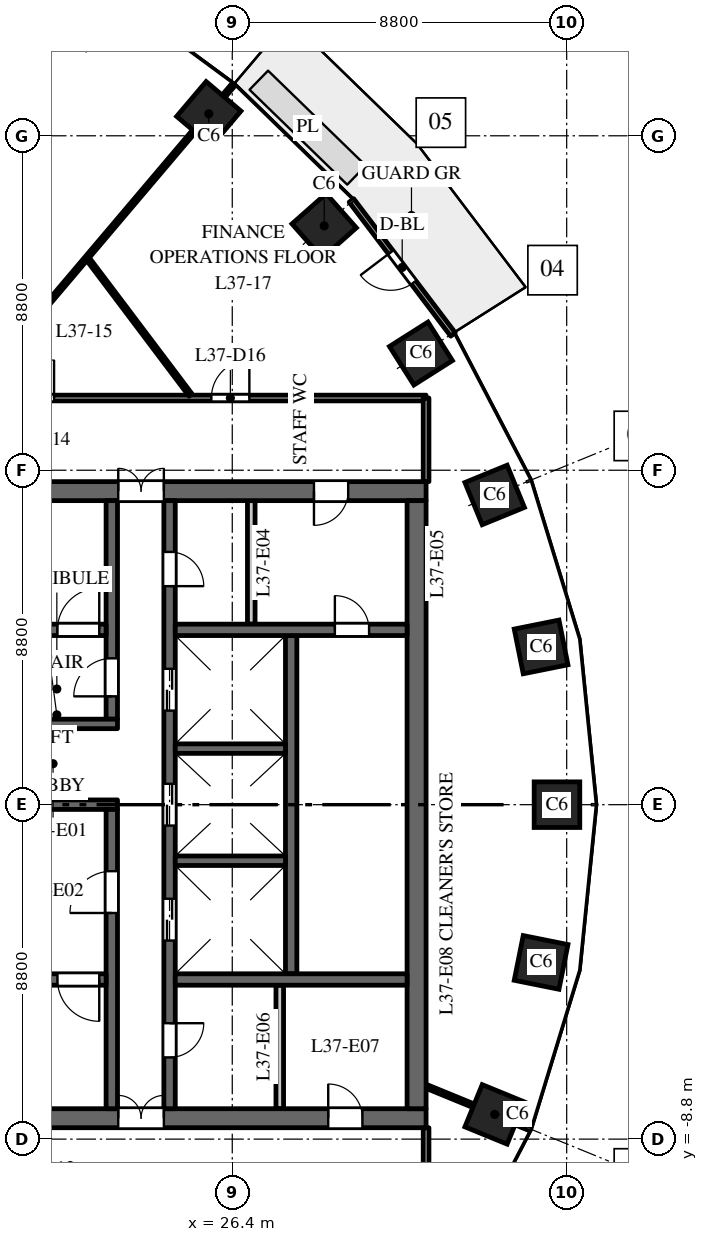
"""IFC4 building model, lengths in metres.
Left out: names, types, materials, properties, quantities, classifications, styles, units other than length and angle.
Written with IfcOpenShell. Run it as: python <this file> out.ifc"""

import sys

from ifc_helpers import new_model, si_unit, direction, frame, frame_2d, origin, origin_2d, place, context, subcontext, project, spatial, rectangle, extrude, element, fill, save


model = new_model("IFC4")
c1 = context("Model", 3, precision=1e-05, world=origin(), true_north=direction((0.0, 1.0)))
c2 = subcontext(c1, "Body", "Model", "MODEL_VIEW")
j1 = project(units=[si_unit("LENGTHUNIT", "METRE"), si_unit("PLANEANGLEUNIT", "RADIAN")], contexts=[c1])
p1 = place(None, origin())
s1 = spatial("IfcSite", under=j1, at=p1, CompositionType="ELEMENT")
p2 = place(p1, origin())
s2 = spatial("IfcBuilding", under=s1, at=p2, CompositionType="ELEMENT")
p3 = place(p2, frame((0.0, 0.0, 162.0)))
s3 = spatial("IfcBuildingStorey", under=s2, at=p3, CompositionType="ELEMENT", Elevation=162.0)
for number, where, z_axis, x_axis in (
    (1, (34.945, 0.0, 0.0), (0.0, 0.0, 1.0), (0.0, 1.0, 0.0)),
    (2, (34.527, 4.151, 0.0), (0.0, 0.0, 1.0), (-0.197, 0.98, 0.0)),
    (3, (33.305, 8.149, 0.0), (0.0, 0.0, 1.0), (-0.379, 0.925, 0.0)),
    (4, (31.365, 11.871, 0.0), (0.0, 0.0, 1.0), (-0.535, 0.845, 0.0)),
    (5, (28.819, 15.23, 0.0), (0.0, 0.0, 1.0), (-0.663, 0.749, 0.0)),
    (6, (25.783, 18.18, 0.0), (0.0, 0.0, 1.0), (-0.763, 0.646, 0.0)),
    (7, (33.305, -8.149, 0.0), (0.0, 0.0, 1.0), (0.379, 0.925, 0.0)),
    (8, (34.527, -4.151, 0.0), (0.0, 0.0, 1.0), (0.197, 0.98, 0.0)),
):
    element("IfcColumn", number, at=place(p3, frame(where, z_axis=z_axis, x_axis=x_axis)), inside=s3, PredefinedType="COLUMN", context=c2, shape_type="SweptSolid", body=[
        extrude(rectangle(XDim=1.2, YDim=1.2, at=origin_2d()), origin(), (0.0, 0.0, 1.0), 4.0),
    ])
p4 = place(p3, frame((16.5, 8.25, 0.0), z_axis=(0.0, 0.0, 1.0), x_axis=(1.0, 0.0, 0.0)))
e9 = element("IfcWall", 9, at=p4, inside=s3, PredefinedType="SHEAR", context=c2, shape_type="SweptSolid", body=[
    extrude(rectangle(XDim=15.0, YDim=0.5, at=frame_2d((7.5, 0.0))), origin(), (0.0, 0.0, 1.0), 3.7),
])
p5 = place(p4, frame((6.9, 0.0, 0.0)))
e10 = element("IfcOpeningElement", 10, at=p5, cuts=e9, PredefinedType="OPENING", context=c2, shape_type="SweptSolid", body=[
    extrude(rectangle(XDim=1.2, YDim=2.1, at=frame_2d((0.6, 1.05))), frame((0.0, 0.26, 0.0), z_axis=(0.0, -1.0, 0.0), x_axis=(1.0, 0.0, 0.0)), (0.0, 0.0, 1.0), 0.52),
])
p6 = place(p4, frame((12.05, 0.0, 0.0)))
e11 = element("IfcOpeningElement", 11, at=p6, cuts=e9, PredefinedType="OPENING", context=c2, shape_type="SweptSolid", body=[
    extrude(rectangle(XDim=0.9, YDim=2.1, at=frame_2d((0.45, 1.05))), frame((0.0, 0.26, 0.0), z_axis=(0.0, -1.0, 0.0), x_axis=(1.0, 0.0, 0.0)), (0.0, 0.0, 1.0), 0.52),
])
p7 = place(p3, frame((16.5, -8.25, 0.0), z_axis=(0.0, 0.0, 1.0), x_axis=(1.0, 0.0, 0.0)))
e12 = element("IfcWall", 12, at=p7, inside=s3, PredefinedType="SHEAR", context=c2, shape_type="SweptSolid", body=[
    extrude(rectangle(XDim=15.0, YDim=0.5, at=frame_2d((7.5, 0.0))), origin(), (0.0, 0.0, 1.0), 3.7),
])
p8 = place(p7, frame((6.9, 0.0, 0.0)))
e13 = element("IfcOpeningElement", 13, at=p8, cuts=e12, PredefinedType="OPENING", context=c2, shape_type="SweptSolid", body=[
    extrude(rectangle(XDim=1.2, YDim=2.1, at=frame_2d((0.6, 1.05))), frame((0.0, 0.26, 0.0), z_axis=(0.0, -1.0, 0.0), x_axis=(1.0, 0.0, 0.0)), (0.0, 0.0, 1.0), 0.52),
])
p9 = place(p7, frame((12.425, 0.0, 0.0)))
e14 = element("IfcOpeningElement", 14, at=p9, cuts=e12, PredefinedType="OPENING", context=c2, shape_type="SweptSolid", body=[
    extrude(rectangle(XDim=0.9, YDim=2.1, at=frame_2d((0.45, 1.05))), frame((0.0, 0.26, 0.0), z_axis=(0.0, -1.0, 0.0), x_axis=(1.0, 0.0, 0.0)), (0.0, 0.0, 1.0), 0.52),
])
p10 = place(p3, frame((27.95, -4.45, 0.0), z_axis=(0.0, 0.0, 1.0), x_axis=(0.0, 1.0, 0.0)))
e15 = element("IfcWall", 15, at=p10, inside=s3, PredefinedType="SHEAR", context=c2, shape_type="SweptSolid", body=[
    extrude(rectangle(XDim=8.9, YDim=0.3, at=frame_2d((4.45, 0.0))), origin(), (0.0, 0.0, 1.0), 3.7),
])
p11 = place(p3, frame((24.75, -8.0, 0.0), z_axis=(0.0, 0.0, 1.0), x_axis=(0.0, 1.0, 0.0)))
e16 = element("IfcWall", 16, at=p11, inside=s3, PredefinedType="SHEAR", context=c2, shape_type="SweptSolid", body=[
    extrude(rectangle(XDim=16.0, YDim=0.3, at=frame_2d((8.0, 0.0))), origin(), (0.0, 0.0, 1.0), 3.7),
])
p12 = place(p11, frame((4.425, 0.0, 0.0)))
e17 = element("IfcOpeningElement", 17, at=p12, cuts=e16, PredefinedType="OPENING", context=c2, shape_type="SweptSolid", body=[
    extrude(rectangle(XDim=1.1, YDim=2.1, at=frame_2d((0.55, 1.05))), frame((0.0, 0.16, 0.0), z_axis=(0.0, -1.0, 0.0), x_axis=(1.0, 0.0, 0.0)), (0.0, 0.0, 1.0), 0.32),
])
p13 = place(p11, frame((7.45, 0.0, 0.0)))
e18 = element("IfcOpeningElement", 18, at=p13, cuts=e16, PredefinedType="OPENING", context=c2, shape_type="SweptSolid", body=[
    extrude(rectangle(XDim=1.1, YDim=2.1, at=frame_2d((0.55, 1.05))), frame((0.0, 0.16, 0.0), z_axis=(0.0, -1.0, 0.0), x_axis=(1.0, 0.0, 0.0)), (0.0, 0.0, 1.0), 0.32),
])
p14 = place(p11, frame((10.475, 0.0, 0.0)))
e19 = element("IfcOpeningElement", 19, at=p14, cuts=e16, PredefinedType="OPENING", context=c2, shape_type="SweptSolid", body=[
    extrude(rectangle(XDim=1.1, YDim=2.1, at=frame_2d((0.55, 1.05))), frame((0.0, 0.16, 0.0), z_axis=(0.0, -1.0, 0.0), x_axis=(1.0, 0.0, 0.0)), (0.0, 0.0, 1.0), 0.32),
])
p15 = place(p11, frame((13.75, 0.0, 0.0)))
e20 = element("IfcOpeningElement", 20, at=p15, cuts=e16, PredefinedType="OPENING", context=c2, shape_type="SweptSolid", body=[
    extrude(rectangle(XDim=0.9, YDim=2.1, at=frame_2d((0.45, 1.05))), frame((0.0, 0.16, 0.0), z_axis=(0.0, -1.0, 0.0), x_axis=(1.0, 0.0, 0.0)), (0.0, 0.0, 1.0), 0.32),
])
p16 = place(p11, frame((1.35, 0.0, 0.0)))
e21 = element("IfcOpeningElement", 21, at=p16, cuts=e16, PredefinedType="OPENING", context=c2, shape_type="SweptSolid", body=[
    extrude(rectangle(XDim=0.9, YDim=2.1, at=frame_2d((0.45, 1.05))), frame((0.0, 0.16, 0.0), z_axis=(0.0, -1.0, 0.0), x_axis=(1.0, 0.0, 0.0)), (0.0, 0.0, 1.0), 0.32),
])
p17 = place(p3, frame((20.1, 0.0, 0.0), z_axis=(0.0, 0.0, 1.0), x_axis=(1.0, 0.0, 0.0)))
e22 = element("IfcWall", 22, at=p17, inside=s3, PredefinedType="SHEAR", context=c2, shape_type="SweptSolid", body=[
    extrude(rectangle(XDim=3.28, YDim=0.25, at=frame_2d((1.64, 0.0))), origin(), (0.0, 0.0, 1.0), 3.7),
])
p18 = place(p3, frame((31.25, -8.0, 0.0), z_axis=(0.0, 0.0, 1.0), x_axis=(0.0, 1.0, 0.0)))
e23 = element("IfcWall", 23, at=p18, inside=s3, PredefinedType="SHEAR", context=c2, shape_type="SweptSolid", body=[
    extrude(rectangle(XDim=16.0, YDim=0.5, at=frame_2d((8.0, 0.0))), origin(), (0.0, 0.0, 1.0), 3.7),
])
p19 = place(p3, frame((24.9, 4.6, 0.0), z_axis=(0.0, 0.0, 1.0), x_axis=(1.0, 0.0, 0.0)))
e24 = element("IfcWall", 24, at=p19, inside=s3, PredefinedType="SHEAR", context=c2, shape_type="SweptSolid", body=[
    extrude(rectangle(XDim=6.1, YDim=0.3, at=frame_2d((3.05, 0.0))), origin(), (0.0, 0.0, 1.0), 3.7),
])
p20 = place(p19, frame((4.2, 0.0, 0.0)))
e25 = element("IfcOpeningElement", 25, at=p20, cuts=e24, PredefinedType="OPENING", context=c2, shape_type="SweptSolid", body=[
    extrude(rectangle(XDim=0.9, YDim=2.1, at=frame_2d((0.45, 1.05))), frame((0.0, 0.16, 0.0), z_axis=(0.0, -1.0, 0.0), x_axis=(1.0, 0.0, 0.0)), (0.0, 0.0, 1.0), 0.32),
])
for number, where, z_axis, x_axis in (
    (26, (26.9, 4.75, 0.0), (0.0, 0.0, 1.0), (0.0, 1.0, 0.0)),
    (27, (27.65, -8.0, 0.0), (0.0, 0.0, 1.0), (0.0, 1.0, 0.0)),
):
    element("IfcWall", number, at=place(p3, frame(where, z_axis=z_axis, x_axis=x_axis)), inside=s3, PredefinedType="PARTITIONING", context=c2, shape_type="SweptSolid", body=[
        extrude(rectangle(XDim=3.25, YDim=0.2, at=frame_2d((1.625, 0.0))), origin(), (0.0, 0.0, 1.0), 3.7),
    ])
p21 = place(p3, frame((24.9, -4.6, 0.0), z_axis=(0.0, 0.0, 1.0), x_axis=(1.0, 0.0, 0.0)))
e28 = element("IfcWall", 28, at=p21, inside=s3, PredefinedType="SHEAR", context=c2, shape_type="SweptSolid", body=[
    extrude(rectangle(XDim=6.1, YDim=0.3, at=frame_2d((3.05, 0.0))), origin(), (0.0, 0.0, 1.0), 3.7),
])
for number, where, z_axis, x_axis in (
    (29, (24.9, -1.475, 0.0), (0.0, 0.0, 1.0), (1.0, 0.0, 0.0)),
    (30, (24.9, 1.475, 0.0), (0.0, 0.0, 1.0), (1.0, 0.0, 0.0)),
):
    element("IfcWall", number, at=place(p3, frame(where, z_axis=z_axis, x_axis=x_axis)), inside=s3, PredefinedType="SHEAR", context=c2, shape_type="SweptSolid", body=[
        extrude(rectangle(XDim=2.9, YDim=0.25, at=frame_2d((1.45, 0.0))), origin(), (0.0, 0.0, 1.0), 3.7),
    ])
p22 = place(p3, frame((23.23, 2.25, 0.0), z_axis=(0.0, 0.0, 1.0), x_axis=(0.0, 1.0, 0.0)))
e31 = element("IfcWall", 31, at=p22, inside=s3, PredefinedType="SHEAR", context=c2, shape_type="SweptSolid", body=[
    extrude(rectangle(XDim=5.75, YDim=0.3, at=frame_2d((2.875, 0.0))), origin(), (0.0, 0.0, 1.0), 3.7),
])
p23 = place(p22, frame((0.6, 0.0, 0.0)))
e32 = element("IfcOpeningElement", 32, at=p23, cuts=e31, PredefinedType="OPENING", context=c2, shape_type="SweptSolid", body=[
    extrude(rectangle(XDim=1.0, YDim=2.1, at=frame_2d((0.5, 1.05))), frame((0.0, 0.16, 0.0), z_axis=(0.0, -1.0, 0.0), x_axis=(1.0, 0.0, 0.0)), (0.0, 0.0, 1.0), 0.32),
])
p24 = place(p3, frame((23.23, -8.0, 0.0), z_axis=(0.0, 0.0, 1.0), x_axis=(0.0, 1.0, 0.0)))
e33 = element("IfcWall", 33, at=p24, inside=s3, PredefinedType="SHEAR", context=c2, shape_type="SweptSolid", body=[
    extrude(rectangle(XDim=7.875, YDim=0.3, at=frame_2d((3.938, 0.0))), origin(), (0.0, 0.0, 1.0), 3.7),
])
p25 = place(p24, frame((5.15, 0.0, 0.0)))
e34 = element("IfcOpeningElement", 34, at=p25, cuts=e33, PredefinedType="OPENING", context=c2, shape_type="SweptSolid", body=[
    extrude(rectangle(XDim=1.1, YDim=2.1, at=frame_2d((0.55, 1.05))), frame((0.0, 0.16, 0.0), z_axis=(0.0, -1.0, 0.0), x_axis=(1.0, 0.0, 0.0)), (0.0, 0.0, 1.0), 0.32),
])
p26 = place(p3, frame((16.9, 4.6, 0.0), z_axis=(0.0, 0.0, 1.0), x_axis=(1.0, 0.0, 0.0)))
e35 = element("IfcWall", 35, at=p26, inside=s3, PredefinedType="SHEAR", context=c2, shape_type="SweptSolid", body=[
    extrude(rectangle(XDim=6.18, YDim=0.3, at=frame_2d((3.09, 0.0))), origin(), (0.0, 0.0, 1.0), 3.7),
])
p27 = place(p26, frame((4.9, 0.0, 0.0)))
e36 = element("IfcOpeningElement", 36, at=p27, cuts=e35, PredefinedType="OPENING", context=c2, shape_type="SweptSolid", body=[
    extrude(rectangle(XDim=1.1, YDim=2.1, at=frame_2d((0.55, 1.05))), frame((0.0, 0.16, 0.0), z_axis=(0.0, -1.0, 0.0), x_axis=(1.0, 0.0, 0.0)), (0.0, 0.0, 1.0), 0.32),
])
p28 = place(p3, frame((16.9, -4.6, 0.0), z_axis=(0.0, 0.0, 1.0), x_axis=(1.0, 0.0, 0.0)))
e37 = element("IfcWall", 37, at=p28, inside=s3, PredefinedType="SHEAR", context=c2, shape_type="SweptSolid", body=[
    extrude(rectangle(XDim=6.18, YDim=0.3, at=frame_2d((3.09, 0.0))), origin(), (0.0, 0.0, 1.0), 3.7),
])
p29 = place(p28, frame((4.9, 0.0, 0.0)))
e38 = element("IfcOpeningElement", 38, at=p29, cuts=e37, PredefinedType="OPENING", context=c2, shape_type="SweptSolid", body=[
    extrude(rectangle(XDim=1.1, YDim=2.1, at=frame_2d((0.55, 1.05))), frame((0.0, 0.16, 0.0), z_axis=(0.0, -1.0, 0.0), x_axis=(1.0, 0.0, 0.0)), (0.0, 0.0, 1.0), 0.32),
])
p30 = place(p3, frame((20.85, 2.125, 0.0), z_axis=(0.0, 0.0, 1.0), x_axis=(1.0, 0.0, 0.0)))
e39 = element("IfcWall", 39, at=p30, inside=s3, PredefinedType="SHEAR", context=c2, shape_type="SweptSolid", body=[
    extrude(rectangle(XDim=2.53, YDim=0.25, at=frame_2d((1.265, 0.0))), origin(), (0.0, 0.0, 1.0), 3.7),
])
p31 = place(p3, frame((32.208, 12.374, 0.0), z_axis=(0.0, 0.0, 1.0), x_axis=(-0.604045763106, 0.796949632081, 0.0)))
e40 = element("IfcWall", 40, at=p31, inside=s3, PredefinedType="STANDARD", context=c2, shape_type="SweptSolid", body=[
    extrude(rectangle(XDim=4.423, YDim=0.15, at=frame_2d((2.212, 0.0))), origin(), (0.0, 0.0, 1.0), 3.7),
])
p32 = place(p31, frame((1.712, 0.0, 0.0)))
e41 = element("IfcOpeningElement", 41, at=p32, cuts=e40, PredefinedType="OPENING", context=c2, shape_type="SweptSolid", body=[
    extrude(rectangle(XDim=1.0, YDim=2.4, at=frame_2d((0.5, 1.2))), frame((0.0, 0.085, 0.0), z_axis=(0.0, -1.0, 0.0), x_axis=(1.0, 0.0, 0.0)), (0.0, 0.0, 1.0), 0.17),
])
p33 = place(p3, frame((16.5, 10.7, 0.0), z_axis=(0.0, 0.0, 1.0), x_axis=(1.0, 0.0, 0.0)))
e42 = element("IfcWall", 42, at=p33, inside=s3, PredefinedType="PARTITIONING", context=c2, shape_type="SweptSolid", body=[
    extrude(rectangle(XDim=15.0, YDim=0.15, at=frame_2d((7.5, 0.0))), origin(), (0.0, 0.0, 1.0), 2.75),
])
p34 = place(p33, frame((4.211, 0.0, 0.0)))
e43 = element("IfcOpeningElement", 43, at=p34, cuts=e42, PredefinedType="OPENING", context=c2, shape_type="SweptSolid", body=[
    extrude(rectangle(XDim=1.0, YDim=2.1, at=frame_2d((0.5, 1.05))), frame((0.0, 0.085, 0.0), z_axis=(0.0, -1.0, 0.0), x_axis=(1.0, 0.0, 0.0)), (0.0, 0.0, 1.0), 0.17),
])
p35 = place(p33, frame((9.35, 0.0, 0.0)))
e44 = element("IfcOpeningElement", 44, at=p35, cuts=e42, PredefinedType="OPENING", context=c2, shape_type="SweptSolid", body=[
    extrude(rectangle(XDim=1.0, YDim=2.1, at=frame_2d((0.5, 1.05))), frame((0.0, 0.085, 0.0), z_axis=(0.0, -1.0, 0.0), x_axis=(1.0, 0.0, 0.0)), (0.0, 0.0, 1.0), 0.17),
])
p36 = place(p3, frame((19.511, 10.778, 0.0), z_axis=(0.0, 0.0, 1.0), x_axis=(0.646400187952, 0.762998556365, 0.0)))
e45 = element("IfcWall", 45, at=p36, inside=s3, PredefinedType="PARTITIONING", context=c2, shape_type="SweptSolid", body=[
    extrude(rectangle(XDim=10.704, YDim=0.1, at=frame_2d((5.352, 0.0))), origin(), (0.0, 0.0, 1.0), 2.9),
])
p37 = place(p3, frame((22.606, 14.354, 0.0), z_axis=(0.0, 0.0, 1.0), x_axis=(0.602012984229, -0.798486297202, 0.0)))
e46 = element("IfcWall", 46, at=p37, inside=s3, PredefinedType="PARTITIONING", context=c2, shape_type="SweptSolid", body=[
    extrude(rectangle(XDim=4.478, YDim=0.1, at=frame_2d((2.239, 0.0))), origin(), (0.0, 0.0, 1.0), 2.75),
])
p38 = place(p3, frame((31.5, -10.7, 0.0), z_axis=(0.0, 0.0, 1.0), x_axis=(0.0, 1.0, 0.0)))
e47 = element("IfcWall", 47, at=p38, inside=s3, PredefinedType="PARTITIONING", context=c2, shape_type="SweptSolid", body=[
    extrude(rectangle(XDim=2.2, YDim=0.15, at=frame_2d((1.1, 0.0))), origin(), (0.0, 0.0, 1.0), 2.9),
])
p39 = place(p3, frame((31.5, -7.41, 0.0), z_axis=(0.0, 0.0, 1.0), x_axis=(0.925344112436, -0.379128307542, 0.0)))
e48 = element("IfcWall", 48, at=p39, inside=s3, PredefinedType="PARTITIONING", context=c2, shape_type="SweptSolid", body=[
    extrude(rectangle(XDim=2.954, YDim=0.1, at=frame_2d((1.477, 0.0))), origin(), (0.0, 0.0, 1.0), 3.7),
])
p40 = place(p3, frame((31.5, 8.5, 0.0), z_axis=(0.0, 0.0, 1.0), x_axis=(0.0, 1.0, 0.0)))
e49 = element("IfcWall", 49, at=p40, inside=s3, PredefinedType="PARTITIONING", context=c2, shape_type="SweptSolid", body=[
    extrude(rectangle(XDim=2.2, YDim=0.15, at=frame_2d((1.1, 0.0))), origin(), (0.0, 0.0, 1.0), 2.9),
])
p41 = place(p12, origin())
e50 = element("IfcDoor", 50, at=p41, inside=s3, OperationType="DOUBLE_DOOR_SLIDING", PredefinedType="DOOR", context=c2, shape_type="SweptSolid", body=[
    extrude(rectangle(XDim=1.1, YDim=2.1, at=frame_2d((0.55, 1.05))), frame((0.0, 0.025, 0.0), z_axis=(0.0, -1.0, 0.0), x_axis=(1.0, 0.0, 0.0)), (0.0, 0.0, 1.0), 0.05),
])
fill(e17, e50)
p42 = place(p13, origin())
e51 = element("IfcDoor", 51, at=p42, inside=s3, OperationType="DOUBLE_DOOR_SLIDING", PredefinedType="DOOR", context=c2, shape_type="SweptSolid", body=[
    extrude(rectangle(XDim=1.1, YDim=2.1, at=frame_2d((0.55, 1.05))), frame((0.0, 0.025, 0.0), z_axis=(0.0, -1.0, 0.0), x_axis=(1.0, 0.0, 0.0)), (0.0, 0.0, 1.0), 0.05),
])
fill(e18, e51)
p43 = place(p14, origin())
e52 = element("IfcDoor", 52, at=p43, inside=s3, OperationType="DOUBLE_DOOR_SLIDING", PredefinedType="DOOR", context=c2, shape_type="SweptSolid", body=[
    extrude(rectangle(XDim=1.1, YDim=2.1, at=frame_2d((0.55, 1.05))), frame((0.0, 0.025, 0.0), z_axis=(0.0, -1.0, 0.0), x_axis=(1.0, 0.0, 0.0)), (0.0, 0.0, 1.0), 0.05),
])
fill(e19, e52)
p44 = place(p27, origin())
e53 = element("IfcDoor", 53, at=p44, inside=s3, OperationType="SINGLE_SWING_LEFT", PredefinedType="DOOR", context=c2, shape_type="SweptSolid", body=[
    extrude(rectangle(XDim=1.1, YDim=2.1, at=frame_2d((0.55, 1.05))), frame((0.0, 0.025, 0.0), z_axis=(0.0, -1.0, 0.0), x_axis=(1.0, 0.0, 0.0)), (0.0, 0.0, 1.0), 0.05),
])
fill(e36, e53)
p45 = place(p29, origin())
e54 = element("IfcDoor", 54, at=p45, inside=s3, OperationType="SINGLE_SWING_RIGHT", PredefinedType="DOOR", context=c2, shape_type="SweptSolid", body=[
    extrude(rectangle(XDim=1.1, YDim=2.1, at=frame_2d((0.55, 1.05))), frame((0.0, 0.025, 0.0), z_axis=(0.0, -1.0, 0.0), x_axis=(1.0, 0.0, 0.0)), (0.0, 0.0, 1.0), 0.05),
])
fill(e38, e54)
p46 = place(p25, origin())
e55 = element("IfcDoor", 55, at=p46, inside=s3, OperationType="SINGLE_SWING_RIGHT", PredefinedType="DOOR", context=c2, shape_type="SweptSolid", body=[
    extrude(rectangle(XDim=1.1, YDim=2.1, at=frame_2d((0.55, 1.05))), frame((0.0, 0.025, 0.0), z_axis=(0.0, -1.0, 0.0), x_axis=(1.0, 0.0, 0.0)), (0.0, 0.0, 1.0), 0.05),
])
fill(e34, e55)
p47 = place(p23, origin())
e56 = element("IfcDoor", 56, at=p47, inside=s3, OperationType="SINGLE_SWING_RIGHT", PredefinedType="DOOR", context=c2, shape_type="SweptSolid", body=[
    extrude(rectangle(XDim=1.0, YDim=2.1, at=frame_2d((0.5, 1.05))), frame((0.0, 0.025, 0.0), z_axis=(0.0, -1.0, 0.0), x_axis=(1.0, 0.0, 0.0)), (0.0, 0.0, 1.0), 0.05),
])
fill(e32, e56)
p48 = place(p5, origin())
e57 = element("IfcDoor", 57, at=p48, inside=s3, OperationType="DOUBLE_DOOR_DOUBLE_SWING", PredefinedType="DOOR", context=c2, shape_type="SweptSolid", body=[
    extrude(rectangle(XDim=1.2, YDim=2.1, at=frame_2d((0.6, 1.05))), frame((0.0, 0.025, 0.0), z_axis=(0.0, -1.0, 0.0), x_axis=(1.0, 0.0, 0.0)), (0.0, 0.0, 1.0), 0.05),
])
fill(e10, e57)
p49 = place(p8, origin())
e58 = element("IfcDoor", 58, at=p49, inside=s3, OperationType="DOUBLE_DOOR_DOUBLE_SWING", PredefinedType="DOOR", context=c2, shape_type="SweptSolid", body=[
    extrude(rectangle(XDim=1.2, YDim=2.1, at=frame_2d((0.6, 1.05))), frame((0.0, 0.025, 0.0), z_axis=(0.0, -1.0, 0.0), x_axis=(1.0, 0.0, 0.0)), (0.0, 0.0, 1.0), 0.05),
])
fill(e13, e58)
p50 = place(p15, origin())
e59 = element("IfcDoor", 59, at=p50, inside=s3, OperationType="SINGLE_SWING_LEFT", PredefinedType="DOOR", context=c2, shape_type="SweptSolid", body=[
    extrude(rectangle(XDim=0.9, YDim=2.1, at=frame_2d((0.45, 1.05))), frame((0.0, 0.025, 0.0), z_axis=(0.0, -1.0, 0.0), x_axis=(1.0, 0.0, 0.0)), (0.0, 0.0, 1.0), 0.05),
])
fill(e20, e59)
p51 = place(p6, origin())
e60 = element("IfcDoor", 60, at=p51, inside=s3, OperationType="SINGLE_SWING_LEFT", PredefinedType="DOOR", context=c2, shape_type="SweptSolid", body=[
    extrude(rectangle(XDim=0.9, YDim=2.1, at=frame_2d((0.45, 1.05))), frame((0.0, 0.025, 0.0), z_axis=(0.0, -1.0, 0.0), x_axis=(1.0, 0.0, 0.0)), (0.0, 0.0, 1.0), 0.05),
])
fill(e11, e60)
p52 = place(p16, origin())
e61 = element("IfcDoor", 61, at=p52, inside=s3, OperationType="SINGLE_SWING_RIGHT", PredefinedType="DOOR", context=c2, shape_type="SweptSolid", body=[
    extrude(rectangle(XDim=0.9, YDim=2.1, at=frame_2d((0.45, 1.05))), frame((0.0, 0.025, 0.0), z_axis=(0.0, -1.0, 0.0), x_axis=(1.0, 0.0, 0.0)), (0.0, 0.0, 1.0), 0.05),
])
fill(e21, e61)
p53 = place(p9, origin())
e62 = element("IfcDoor", 62, at=p53, inside=s3, OperationType="SINGLE_SWING_RIGHT", PredefinedType="DOOR", context=c2, shape_type="SweptSolid", body=[
    extrude(rectangle(XDim=0.9, YDim=2.1, at=frame_2d((0.45, 1.05))), frame((0.0, 0.025, 0.0), z_axis=(0.0, -1.0, 0.0), x_axis=(1.0, 0.0, 0.0)), (0.0, 0.0, 1.0), 0.05),
])
fill(e14, e62)
p54 = place(p20, origin())
e63 = element("IfcDoor", 63, at=p54, inside=s3, OperationType="SINGLE_SWING_RIGHT", PredefinedType="DOOR", context=c2, shape_type="SweptSolid", body=[
    extrude(rectangle(XDim=0.9, YDim=2.1, at=frame_2d((0.45, 1.05))), frame((0.0, 0.025, 0.0), z_axis=(0.0, -1.0, 0.0), x_axis=(1.0, 0.0, 0.0)), (0.0, 0.0, 1.0), 0.05),
])
fill(e25, e63)
p55 = place(p32, origin())
e64 = element("IfcDoor", 64, at=p55, inside=s3, OperationType="SINGLE_SWING_RIGHT", PredefinedType="DOOR", context=c2, shape_type="SweptSolid", body=[
    extrude(rectangle(XDim=1.0, YDim=2.4, at=frame_2d((0.5, 1.2))), frame((0.0, 0.025, 0.0), z_axis=(0.0, -1.0, 0.0), x_axis=(1.0, 0.0, 0.0)), (0.0, 0.0, 1.0), 0.05),
])
fill(e41, e64)
p56 = place(p34, origin())
e65 = element("IfcDoor", 65, at=p56, inside=s3, OperationType="SINGLE_SWING_RIGHT", PredefinedType="DOOR", context=c2, shape_type="SweptSolid", body=[
    extrude(rectangle(XDim=1.0, YDim=2.1, at=frame_2d((0.5, 1.05))), frame((0.0, 0.025, 0.0), z_axis=(0.0, -1.0, 0.0), x_axis=(1.0, 0.0, 0.0)), (0.0, 0.0, 1.0), 0.05),
])
fill(e43, e65)
p57 = place(p35, origin())
e66 = element("IfcDoor", 66, at=p57, inside=s3, OperationType="SINGLE_SWING_RIGHT", PredefinedType="DOOR", context=c2, shape_type="SweptSolid", body=[
    extrude(rectangle(XDim=1.0, YDim=2.1, at=frame_2d((0.5, 1.05))), frame((0.0, 0.025, 0.0), z_axis=(0.0, -1.0, 0.0), x_axis=(1.0, 0.0, 0.0)), (0.0, 0.0, 1.0), 0.05),
])
fill(e44, e66)
save(model, sys.argv[1])
